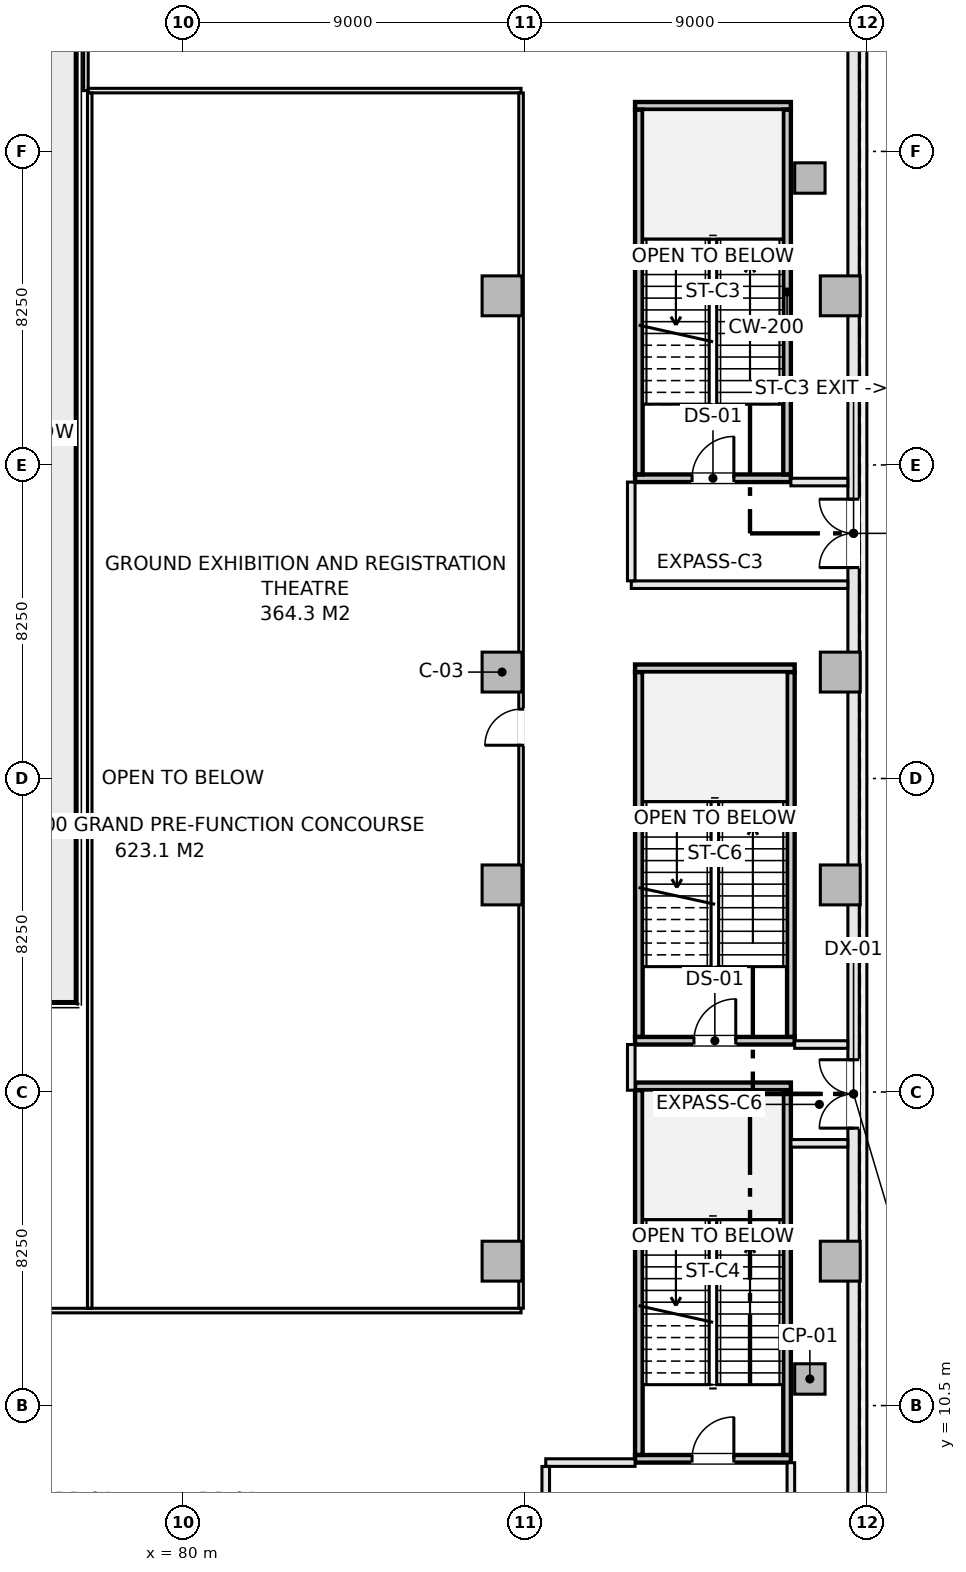
"""IFC4 building model, lengths in metres.
Left out: names, types, materials, properties, quantities, classifications, styles, units other than length and angle.
Written with IfcOpenShell. Run it as: python <this file> out.ifc"""

import sys

from ifc_helpers import new_model, si_unit, direction, frame, frame_2d, origin, origin_2d, place, context, subcontext, project, spatial, rectangle, extrude, element, fill, save


model = new_model("IFC4")
c1 = context("Model", 3, precision=1e-05, world=origin(), true_north=direction((0.0, 1.0)))
c2 = subcontext(c1, "Body", "Model", "MODEL_VIEW")
j1 = project(units=[si_unit("LENGTHUNIT", "METRE"), si_unit("PLANEANGLEUNIT", "RADIAN")], contexts=[c1])
p1 = place(None, origin())
s1 = spatial("IfcSite", under=j1, at=p1, CompositionType="ELEMENT")
p2 = place(p1, origin())
s2 = spatial("IfcBuilding", under=s1, at=p2, CompositionType="ELEMENT")
p3 = place(p2, origin())
s3 = spatial("IfcBuildingStorey", under=s2, at=p3, CompositionType="ELEMENT", Elevation=0.0)
for number, where, z_axis, x_axis in (
    (1, (88.4, 14.3, -0.36), (0.0, 0.0, 1.0), (1.0, 0.0, 0.0)),
    (2, (88.4, 24.2, -0.36), (0.0, 0.0, 1.0), (1.0, 0.0, 0.0)),
    (3, (88.4, 29.8, -0.36), (0.0, 0.0, 1.0), (1.0, 0.0, 0.0)),
    (4, (88.4, 39.7, -0.36), (0.0, 0.0, 1.0), (1.0, 0.0, 0.0)),
    (5, (97.3, 14.3, -0.36), (0.0, 0.0, 1.0), (1.0, 0.0, 0.0)),
    (6, (97.3, 24.2, -0.36), (0.0, 0.0, 1.0), (1.0, 0.0, 0.0)),
    (7, (97.3, 29.8, -0.36), (0.0, 0.0, 1.0), (1.0, 0.0, 0.0)),
    (8, (97.3, 39.7, -0.36), (0.0, 0.0, 1.0), (1.0, 0.0, 0.0)),
):
    element("IfcColumn", number, at=place(p3, frame(where, z_axis=z_axis, x_axis=x_axis)), inside=s3, PredefinedType="COLUMN", context=c2, shape_type="SweptSolid", body=[
        extrude(rectangle(XDim=1.05, YDim=1.05, at=origin_2d()), origin(), (0.0, 0.0, 1.0), 5.1),
    ])
for number, where, z_axis, x_axis in (
    (9, (96.5, 11.2, -0.36), (0.0, 0.0, 1.0), (1.0, 0.0, 0.0)),
    (10, (96.5, 42.8, -0.36), (0.0, 0.0, 1.0), (1.0, 0.0, 0.0)),
):
    element("IfcColumn", number, at=place(p3, frame(where, z_axis=z_axis, x_axis=x_axis)), inside=s3, PredefinedType="PILASTER", context=c2, shape_type="SweptSolid", body=[
        extrude(rectangle(XDim=0.8, YDim=0.8, at=origin_2d()), origin(), (0.0, 0.0, 1.0), 5.1),
    ])
p4 = place(p3, frame((97.65, 2.35, 0.0), z_axis=(0.0, 0.0, 1.0), x_axis=(0.0, 1.0, 0.0)))
e11 = element("IfcWall", 11, at=p4, inside=s3, PredefinedType="SOLIDWALL", context=c2, shape_type="SweptSolid", body=[
    extrude(rectangle(XDim=49.3, YDim=0.3, at=frame_2d((24.65, 0.0))), origin(), (0.0, 0.0, 1.0), 4.74),
])
p5 = place(p4, frame((15.45, 0.0, 0.0)))
e12 = element("IfcOpeningElement", 12, at=p5, cuts=e11, PredefinedType="OPENING", context=c2, shape_type="SweptSolid", body=[
    extrude(rectangle(XDim=1.8, YDim=2.3, at=frame_2d((0.9, 1.15))), frame((0.0, 0.16, 0.0), z_axis=(0.0, -1.0, 0.0), x_axis=(1.0, 0.0, 0.0)), (0.0, 0.0, 1.0), 0.32),
])
p6 = place(p4, frame((30.2, 0.0, 0.0)))
e13 = element("IfcOpeningElement", 13, at=p6, cuts=e11, PredefinedType="OPENING", context=c2, shape_type="SweptSolid", body=[
    extrude(rectangle(XDim=1.8, YDim=2.3, at=frame_2d((0.9, 1.15))), frame((0.0, 0.16, 0.0), z_axis=(0.0, -1.0, 0.0), x_axis=(1.0, 0.0, 0.0)), (0.0, 0.0, 1.0), 0.32),
])
p7 = place(p3, frame((91.9, 34.9, -0.36), z_axis=(0.0, 0.0, 1.0), x_axis=(1.0, 0.0, 0.0)))
e14 = element("IfcWall", 14, at=p7, inside=s3, PredefinedType="SHEAR", context=c2, shape_type="SweptSolid", body=[
    extrude(rectangle(XDim=4.1, YDim=0.2, at=frame_2d((2.05, 0.0))), origin(), (0.0, 0.0, 1.0), 5.1),
])
p8 = place(p7, frame((1.5, 0.0, 0.36)))
e15 = element("IfcOpeningElement", 15, at=p8, cuts=e14, PredefinedType="OPENING", context=c2, shape_type="SweptSolid", body=[
    extrude(rectangle(XDim=1.1, YDim=2.15, at=frame_2d((0.55, 1.075))), frame((0.0, 0.11, 0.0), z_axis=(0.0, -1.0, 0.0), x_axis=(1.0, 0.0, 0.0)), (0.0, 0.0, 1.0), 0.22),
])
p9 = place(p3, frame((91.9, 44.7, -0.36), z_axis=(0.0, 0.0, 1.0), x_axis=(1.0, 0.0, 0.0)))
e16 = element("IfcWall", 16, at=p9, inside=s3, PredefinedType="SHEAR", context=c2, shape_type="SweptSolid", body=[
    extrude(rectangle(XDim=4.1, YDim=0.2, at=frame_2d((2.05, 0.0))), origin(), (0.0, 0.0, 1.0), 5.1),
])
for number, where, z_axis, x_axis in (
    (17, (92.0, 35.002, -0.36), (0.0, 0.0, 1.0), (0.0, 1.0, 0.0)),
    (18, (95.9, 35.002, -0.36), (0.0, 0.0, 1.0), (0.0, 1.0, 0.0)),
):
    element("IfcWall", number, at=place(p3, frame(where, z_axis=z_axis, x_axis=x_axis)), inside=s3, PredefinedType="SHEAR", context=c2, shape_type="SweptSolid", body=[
        extrude(rectangle(XDim=9.596, YDim=0.2, at=frame_2d((4.798, 0.0))), origin(), (0.0, 0.0, 1.0), 5.1),
    ])
p10 = place(p3, frame((91.9, 9.1, -0.36), z_axis=(0.0, 0.0, 1.0), x_axis=(1.0, 0.0, 0.0)))
e19 = element("IfcWall", 19, at=p10, inside=s3, PredefinedType="SHEAR", context=c2, shape_type="SweptSolid", body=[
    extrude(rectangle(XDim=4.1, YDim=0.2, at=frame_2d((2.05, 0.0))), origin(), (0.0, 0.0, 1.0), 5.1),
])
p11 = place(p10, frame((1.5, 0.0, 0.36)))
e20 = element("IfcOpeningElement", 20, at=p11, cuts=e19, PredefinedType="OPENING", context=c2, shape_type="SweptSolid", body=[
    extrude(rectangle(XDim=1.1, YDim=2.15, at=frame_2d((0.55, 1.075))), frame((0.0, 0.11, 0.0), z_axis=(0.0, -1.0, 0.0), x_axis=(1.0, 0.0, 0.0)), (0.0, 0.0, 1.0), 0.22),
])
p12 = place(p3, frame((91.9, 18.9, -0.36), z_axis=(0.0, 0.0, 1.0), x_axis=(1.0, 0.0, 0.0)))
e21 = element("IfcWall", 21, at=p12, inside=s3, PredefinedType="SHEAR", context=c2, shape_type="SweptSolid", body=[
    extrude(rectangle(XDim=4.1, YDim=0.2, at=frame_2d((2.05, 0.0))), origin(), (0.0, 0.0, 1.0), 5.1),
])
for number, where, z_axis, x_axis in (
    (22, (92.0, 9.202, -0.36), (0.0, 0.0, 1.0), (0.0, 1.0, 0.0)),
    (23, (95.9, 9.202, -0.36), (0.0, 0.0, 1.0), (0.0, 1.0, 0.0)),
):
    element("IfcWall", number, at=place(p3, frame(where, z_axis=z_axis, x_axis=x_axis)), inside=s3, PredefinedType="SHEAR", context=c2, shape_type="SweptSolid", body=[
        extrude(rectangle(XDim=9.596, YDim=0.2, at=frame_2d((4.798, 0.0))), origin(), (0.0, 0.0, 1.0), 5.1),
    ])
p13 = place(p3, frame((91.9, 20.1, -0.36), z_axis=(0.0, 0.0, 1.0), x_axis=(1.0, 0.0, 0.0)))
e24 = element("IfcWall", 24, at=p13, inside=s3, PredefinedType="SHEAR", context=c2, shape_type="SweptSolid", body=[
    extrude(rectangle(XDim=4.2, YDim=0.2, at=frame_2d((2.1, 0.0))), origin(), (0.0, 0.0, 1.0), 5.1),
])
p14 = place(p13, frame((1.55, 0.0, 0.36)))
e25 = element("IfcOpeningElement", 25, at=p14, cuts=e24, PredefinedType="OPENING", context=c2, shape_type="SweptSolid", body=[
    extrude(rectangle(XDim=1.1, YDim=2.15, at=frame_2d((0.55, 1.075))), frame((0.0, 0.11, 0.0), z_axis=(0.0, -1.0, 0.0), x_axis=(1.0, 0.0, 0.0)), (0.0, 0.0, 1.0), 0.22),
])
p15 = place(p3, frame((91.9, 29.9, -0.36), z_axis=(0.0, 0.0, 1.0), x_axis=(1.0, 0.0, 0.0)))
e26 = element("IfcWall", 26, at=p15, inside=s3, PredefinedType="SHEAR", context=c2, shape_type="SweptSolid", body=[
    extrude(rectangle(XDim=4.2, YDim=0.2, at=frame_2d((2.1, 0.0))), origin(), (0.0, 0.0, 1.0), 5.1),
])
for number, where, z_axis, x_axis in (
    (27, (92.0, 20.202, -0.36), (0.0, 0.0, 1.0), (0.0, 1.0, 0.0)),
    (28, (96.0, 20.202, -0.36), (0.0, 0.0, 1.0), (0.0, 1.0, 0.0)),
):
    element("IfcWall", number, at=place(p3, frame(where, z_axis=z_axis, x_axis=x_axis)), inside=s3, PredefinedType="SHEAR", context=c2, shape_type="SweptSolid", body=[
        extrude(rectangle(XDim=9.596, YDim=0.2, at=frame_2d((4.798, 0.0))), origin(), (0.0, 0.0, 1.0), 5.1),
    ])
p16 = place(p3, frame((96.002, 17.4, 0.0), z_axis=(0.0, 0.0, 1.0), x_axis=(1.0, 0.0, 0.0)))
e29 = element("IfcWall", 29, at=p16, inside=s3, PredefinedType="SOLIDWALL", context=c2, shape_type="SweptSolid", body=[
    extrude(rectangle(XDim=1.496, YDim=0.2, at=frame_2d((0.748, 0.0))), origin(), (0.0, 0.0, 1.0), 4.74),
])
p17 = place(p3, frame((91.8, 32.1, 0.0), z_axis=(0.0, 0.0, 1.0), x_axis=(1.0, 0.0, 0.0)))
e30 = element("IfcWall", 30, at=p17, inside=s3, PredefinedType="SOLIDWALL", context=c2, shape_type="SweptSolid", body=[
    extrude(rectangle(XDim=5.698, YDim=0.2, at=frame_2d((2.849, 0.0))), origin(), (0.0, 0.0, 1.0), 4.74),
])
p18 = place(p3, frame((96.0, 34.8, 0.0), z_axis=(0.0, 0.0, 1.0), x_axis=(1.0, 0.0, 0.0)))
e31 = element("IfcWall", 31, at=p18, inside=s3, PredefinedType="SOLIDWALL", context=c2, shape_type="SweptSolid", body=[
    extrude(rectangle(XDim=1.498, YDim=0.2, at=frame_2d((0.749, 0.0))), origin(), (0.0, 0.0, 1.0), 4.375),
])
p19 = place(p3, frame((89.55, 9.0, 0.0), z_axis=(0.0, 0.0, 1.0), x_axis=(1.0, 0.0, 0.0)))
e32 = element("IfcWall", 32, at=p19, inside=s3, PredefinedType="SOLIDWALL", context=c2, shape_type="SweptSolid", body=[
    extrude(rectangle(XDim=2.35, YDim=0.2, at=frame_2d((1.175, 0.0))), origin(), (0.0, 0.0, 1.0), 4.74),
])
p20 = place(p3, frame((91.8, 18.798, 0.0), z_axis=(0.0, 0.0, 1.0), x_axis=(0.0, 1.0, 0.0)))
e33 = element("IfcWall", 33, at=p20, inside=s3, PredefinedType="SOLIDWALL", context=c2, shape_type="SweptSolid", body=[
    extrude(rectangle(XDim=1.202, YDim=0.2, at=frame_2d((0.601, 0.0))), origin(), (0.0, 0.0, 1.0), 4.74),
])
p21 = place(p3, frame((91.8, 32.202, 0.0), z_axis=(0.0, 0.0, 1.0), x_axis=(0.0, 1.0, 0.0)))
e34 = element("IfcWall", 34, at=p21, inside=s3, PredefinedType="SOLIDWALL", context=c2, shape_type="SweptSolid", body=[
    extrude(rectangle(XDim=2.598, YDim=0.2, at=frame_2d((1.299, 0.0))), origin(), (0.0, 0.0, 1.0), 4.74),
])
p22 = place(p3, frame((89.55, 2.502, 0.0), z_axis=(0.0, 0.0, 1.0), x_axis=(0.0, 1.0, 0.0)))
e35 = element("IfcWall", 35, at=p22, inside=s3, PredefinedType="SOLIDWALL", context=c2, shape_type="SweptSolid", body=[
    extrude(rectangle(XDim=6.396, YDim=0.2, at=frame_2d((3.198, 0.0))), origin(), (0.0, 0.0, 1.0), 4.74),
])
p23 = place(p3, frame((96.0, 6.852, 0.0), z_axis=(0.0, 0.0, 1.0), x_axis=(0.0, 1.0, 0.0)))
e36 = element("IfcWall", 36, at=p23, inside=s3, PredefinedType="SOLIDWALL", context=c2, shape_type="SweptSolid", body=[
    extrude(rectangle(XDim=2.146, YDim=0.2, at=frame_2d((1.073, 0.0))), origin(), (0.0, 0.0, 1.0), 4.74),
])
p24 = place(p3, frame((96.1, 20.0, 0.0), z_axis=(0.0, 0.0, 1.0), x_axis=(1.0, 0.0, 0.0)))
e37 = element("IfcWall", 37, at=p24, inside=s3, PredefinedType="SOLIDWALL", context=c2, shape_type="SweptSolid", body=[
    extrude(rectangle(XDim=1.398, YDim=0.2, at=frame_2d((0.699, 0.0))), origin(), (0.0, 0.0, 1.0), 4.74),
])
p25 = place(p3, frame((77.45, 45.1, 0.0), z_axis=(0.0, 0.0, 1.0), x_axis=(0.0, 1.0, 0.0)))
e38 = element("IfcWall", 38, at=p25, inside=s3, PredefinedType="PARTITIONING", context=c2, shape_type="SweptSolid", body=[
    extrude(rectangle(XDim=6.398, YDim=0.12, at=frame_2d((3.199, 0.0))), origin(), (0.0, 0.0, 1.0), 4.74),
])
p26 = place(p3, frame((77.512, 45.1, 0.0), z_axis=(0.0, 0.0, 1.0), x_axis=(1.0, 0.0, 0.0)))
e39 = element("IfcWall", 39, at=p26, inside=s3, PredefinedType="PARTITIONING", context=c2, shape_type="SweptSolid", body=[
    extrude(rectangle(XDim=11.388, YDim=0.12, at=frame_2d((5.694, 0.0))), origin(), (0.0, 0.0, 1.0), 4.74),
])
p27 = place(p3, frame((71.162, 13.0, 0.0), z_axis=(0.0, 0.0, 1.0), x_axis=(1.0, 0.0, 0.0)))
e40 = element("IfcWall", 40, at=p27, inside=s3, PredefinedType="PARTITIONING", context=c2, shape_type="SweptSolid", body=[
    extrude(rectangle(XDim=17.738, YDim=0.12, at=frame_2d((8.869, 0.0))), origin(), (0.0, 0.0, 1.0), 4.74),
])
p28 = place(p3, frame((88.9, 13.062, 0.0), z_axis=(0.0, 0.0, 1.0), x_axis=(0.0, 1.0, 0.0)))
e41 = element("IfcWall", 41, at=p28, inside=s3, PredefinedType="PARTITIONING", context=c2, shape_type="SweptSolid", body=[
    extrude(rectangle(XDim=31.976, YDim=0.12, at=frame_2d((15.988, 0.0))), origin(), (0.0, 0.0, 1.0), 4.74),
])
p29 = place(p28, frame((14.813, 0.0, 0.0)))
e42 = element("IfcOpeningElement", 42, at=p29, cuts=e41, PredefinedType="OPENING", context=c2, shape_type="SweptSolid", body=[
    extrude(rectangle(XDim=0.95, YDim=2.1, at=frame_2d((0.475, 1.05))), frame((0.0, 0.07, 0.0), z_axis=(0.0, -1.0, 0.0), x_axis=(1.0, 0.0, 0.0)), (0.0, 0.0, 1.0), 0.14),
])
p30 = place(p3, frame((77.55, 13.062, 0.0), z_axis=(0.0, 0.0, 1.0), x_axis=(0.0, 1.0, 0.0)))
e43 = element("IfcWall", 43, at=p30, inside=s3, PredefinedType="PARTITIONING", context=c2, shape_type="SweptSolid", body=[
    extrude(rectangle(XDim=31.976, YDim=0.12, at=frame_2d((15.988, 0.0))), origin(), (0.0, 0.0, 1.0), 4.74),
])
p31 = place(p5, frame((1.8, 0.0, 0.0), z_axis=(0.0, 0.0, 1.0), x_axis=(-1.0, 0.0, 0.0)))
e44 = element("IfcDoor", 44, at=p31, inside=s3, OperationType="DOUBLE_DOOR_SINGLE_SWING", PredefinedType="DOOR", context=c2, shape_type="SweptSolid", body=[
    extrude(rectangle(XDim=1.8, YDim=2.3, at=frame_2d((0.9, 1.15))), frame((0.0, 0.025, 0.0), z_axis=(0.0, -1.0, 0.0), x_axis=(1.0, 0.0, 0.0)), (0.0, 0.0, 1.0), 0.05),
])
fill(e12, e44)
p32 = place(p6, frame((1.8, 0.0, 0.0), z_axis=(0.0, 0.0, 1.0), x_axis=(-1.0, 0.0, 0.0)))
e45 = element("IfcDoor", 45, at=p32, inside=s3, OperationType="DOUBLE_DOOR_SINGLE_SWING", PredefinedType="DOOR", context=c2, shape_type="SweptSolid", body=[
    extrude(rectangle(XDim=1.8, YDim=2.3, at=frame_2d((0.9, 1.15))), frame((0.0, 0.025, 0.0), z_axis=(0.0, -1.0, 0.0), x_axis=(1.0, 0.0, 0.0)), (0.0, 0.0, 1.0), 0.05),
])
fill(e13, e45)
p33 = place(p8, origin())
e46 = element("IfcDoor", 46, at=p33, inside=s3, OperationType="SINGLE_SWING_RIGHT", PredefinedType="DOOR", context=c2, shape_type="SweptSolid", body=[
    extrude(rectangle(XDim=1.1, YDim=2.15, at=frame_2d((0.55, 1.075))), frame((0.0, 0.025, 0.0), z_axis=(0.0, -1.0, 0.0), x_axis=(1.0, 0.0, 0.0)), (0.0, 0.0, 1.0), 0.05),
])
fill(e15, e46)
p34 = place(p11, origin())
e47 = element("IfcDoor", 47, at=p34, inside=s3, OperationType="SINGLE_SWING_RIGHT", PredefinedType="DOOR", context=c2, shape_type="SweptSolid", body=[
    extrude(rectangle(XDim=1.1, YDim=2.15, at=frame_2d((0.55, 1.075))), frame((0.0, 0.025, 0.0), z_axis=(0.0, -1.0, 0.0), x_axis=(1.0, 0.0, 0.0)), (0.0, 0.0, 1.0), 0.05),
])
fill(e20, e47)
p35 = place(p14, origin())
e48 = element("IfcDoor", 48, at=p35, inside=s3, OperationType="SINGLE_SWING_RIGHT", PredefinedType="DOOR", context=c2, shape_type="SweptSolid", body=[
    extrude(rectangle(XDim=1.1, YDim=2.15, at=frame_2d((0.55, 1.075))), frame((0.0, 0.025, 0.0), z_axis=(0.0, -1.0, 0.0), x_axis=(1.0, 0.0, 0.0)), (0.0, 0.0, 1.0), 0.05),
])
fill(e25, e48)
p36 = place(p29, origin())
e49 = element("IfcDoor", 49, at=p36, inside=s3, OperationType="SINGLE_SWING_LEFT", PredefinedType="DOOR", context=c2, shape_type="SweptSolid", body=[
    extrude(rectangle(XDim=0.95, YDim=2.1, at=frame_2d((0.475, 1.05))), frame((0.0, 0.025, 0.0), z_axis=(0.0, -1.0, 0.0), x_axis=(1.0, 0.0, 0.0)), (0.0, 0.0, 1.0), 0.05),
])
fill(e42, e49)
save(model, sys.argv[1])
